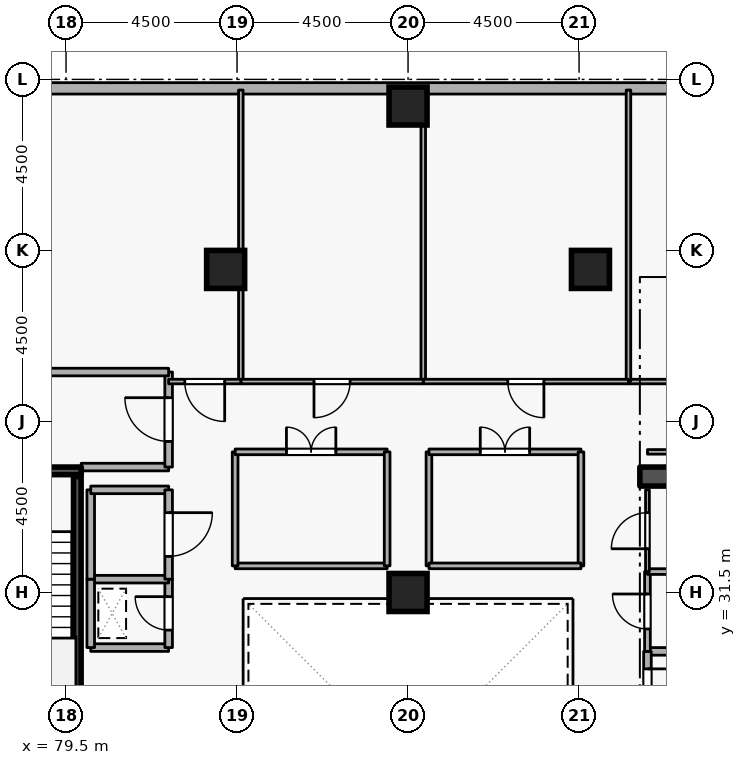
"""IFC4 building model, lengths in metres.
Left out: names, types, materials, properties, quantities, classifications, styles, units other than length and angle.
Written with IfcOpenShell. Run it as: python <this file> out.ifc"""

import sys

from ifc_helpers import new_model, si_unit, direction, frame, frame_2d, origin, origin_2d, place, context, subcontext, project, spatial, rectangle, extrude, element, fill, save


model = new_model("IFC4")
c1 = context("Model", 3, precision=1e-05, world=origin(), true_north=direction((0.0, 1.0)))
c2 = subcontext(c1, "Body", "Model", "MODEL_VIEW")
j1 = project(units=[si_unit("LENGTHUNIT", "METRE"), si_unit("PLANEANGLEUNIT", "RADIAN")], contexts=[c1])
p1 = place(None, origin())
s1 = spatial("IfcSite", under=j1, at=p1, CompositionType="ELEMENT")
p2 = place(p1, origin())
s2 = spatial("IfcBuilding", under=s1, at=p2, CompositionType="ELEMENT")
p3 = place(p2, frame((0.0, 0.0, 225.9)))
s3 = spatial("IfcBuildingStorey", under=s2, at=p3, CompositionType="ELEMENT", Elevation=225.9)
p4 = place(p3, frame((94.6, 34.55, 0.0), z_axis=(0.0, 0.0, 1.0), x_axis=(1.0, 0.0, 0.0)))
e1 = element("IfcWall", 1, at=p4, inside=s3, PredefinedType="SHEAR", context=c2, shape_type="SweptSolid", body=[
    extrude(rectangle(XDim=5.8, YDim=0.5, at=frame_2d((2.9, 0.0))), origin(), (0.0, 0.0, 1.0), 3.6),
])
for number, where, z_axis, x_axis in (
    (2, (88.5, 44.3, 0.0), (0.0, 0.0, 1.0), (1.0, 0.0, 0.0)),
    (3, (93.3, 40.0, 0.0), (0.0, 0.0, 1.0), (1.0, 0.0, 0.0)),
    (4, (83.7, 40.0, 0.0), (0.0, 0.0, 1.0), (1.0, 0.0, 0.0)),
    (5, (88.5, 31.5, 0.0), (0.0, 0.0, 1.0), (1.0, 0.0, 0.0)),
):
    element("IfcColumn", number, at=place(p3, frame(where, z_axis=z_axis, x_axis=x_axis)), inside=s3, PredefinedType="COLUMN", context=c2, shape_type="SweptSolid", body=[
        extrude(rectangle(XDim=1.0, YDim=1.0, at=origin_2d()), origin(), (0.0, 0.0, 1.0), 3.6),
    ])
p5 = place(p3, frame((103.681, 44.765, 0.0), z_axis=(0.0, 0.0, 1.0), x_axis=(-1.0, 0.0, 0.0)))
e6 = element("IfcWall", 6, at=p5, inside=s3, PredefinedType="STANDARD", context=c2, shape_type="SweptSolid", body=[
    extrude(rectangle(XDim=36.363, YDim=0.3, at=frame_2d((18.181, 0.0))), origin(), (0.0, 0.0, 1.0), 2.22),
])
p6 = place(p5, frame((30.6, 0.0, 0.72)))
e7 = element("IfcOpeningElement", 7, at=p6, cuts=e6, PredefinedType="OPENING", context=c2, shape_type="SweptSolid", body=[
    extrude(rectangle(XDim=1.35, YDim=1.05, at=frame_2d((0.675, 0.525))), frame((0.0, 0.16, 0.0), z_axis=(0.0, -1.0, 0.0), x_axis=(1.0, 0.0, 0.0)), (0.0, 0.0, 1.0), 0.32),
])
p7 = place(p3, frame((76.55, 34.7, 0.0), z_axis=(0.0, 0.0, 1.0), x_axis=(1.0, 0.0, 0.0)))
e8 = element("IfcWall", 8, at=p7, inside=s3, PredefinedType="SHEAR", context=c2, shape_type="SweptSolid", body=[
    extrude(rectangle(XDim=3.35, YDim=0.2, at=frame_2d((1.675, 0.0))), origin(), (0.0, 0.0, 1.0), 3.6),
])
p8 = place(p7, frame((1.125, 0.0, 0.0)))
e9 = element("IfcOpeningElement", 9, at=p8, cuts=e8, PredefinedType="OPENING", context=c2, shape_type="SweptSolid", body=[
    extrude(rectangle(XDim=1.1, YDim=2.1, at=frame_2d((0.55, 1.05))), frame((0.0, 0.11, 0.0), z_axis=(0.0, -1.0, 0.0), x_axis=(1.0, 0.0, 0.0)), (0.0, 0.0, 1.0), 0.22),
])
p9 = place(p3, frame((79.797, 27.45, 0.0), z_axis=(0.0, 0.0, 1.0), x_axis=(0.0, 1.0, 0.0)))
e10 = element("IfcWall", 10, at=p9, inside=s3, PredefinedType="SHEAR", context=c2, shape_type="SweptSolid", body=[
    extrude(rectangle(XDim=7.1, YDim=0.2, at=frame_2d((3.55, 0.0))), origin(), (0.0, 0.0, 1.0), 3.6),
])
p10 = place(p3, frame((79.9, 34.8, 0.0), z_axis=(0.0, 0.0, 1.0), x_axis=(1.0, 0.0, 0.0)))
e11 = element("IfcWall", 11, at=p10, inside=s3, PredefinedType="STANDARD", context=c2, shape_type="SweptSolid", body=[
    extrude(rectangle(XDim=2.3, YDim=0.2, at=frame_2d((1.15, 0.0))), origin(), (0.0, 0.0, 1.0), 2.505),
])
p11 = place(p3, frame((82.2, 34.8, 0.0), z_axis=(0.0, 0.0, 1.0), x_axis=(0.0, 1.0, 0.0)))
e12 = element("IfcWall", 12, at=p11, inside=s3, PredefinedType="STANDARD", context=c2, shape_type="SweptSolid", body=[
    extrude(rectangle(XDim=2.5, YDim=0.2, at=frame_2d((1.25, 0.0))), origin(), (0.0, 0.0, 1.0), 3.3),
])
p12 = place(p11, frame((0.675, 0.0, 0.0)))
e13 = element("IfcOpeningElement", 13, at=p12, cuts=e12, PredefinedType="OPENING", context=c2, shape_type="SweptSolid", body=[
    extrude(rectangle(XDim=1.15, YDim=2.1, at=frame_2d((0.575, 1.05))), frame((0.0, 0.11, 0.0), z_axis=(0.0, -1.0, 0.0), x_axis=(1.0, 0.0, 0.0)), (0.0, 0.0, 1.0), 0.22),
])
p13 = place(p3, frame((82.2, 37.3, 0.0), z_axis=(0.0, 0.0, 1.0), x_axis=(-1.0, 0.0, 0.0)))
e14 = element("IfcWall", 14, at=p13, inside=s3, PredefinedType="STANDARD", context=c2, shape_type="SweptSolid", body=[
    extrude(rectangle(XDim=5.7, YDim=0.2, at=frame_2d((2.85, 0.0))), origin(), (0.0, 0.0, 1.0), 3.3),
])
p14 = place(p3, frame((96.85, 29.95, 0.0), z_axis=(0.0, 0.0, 1.0), x_axis=(-1.0, 0.0, 0.0)))
e15 = element("IfcWall", 15, at=p14, inside=s3, PredefinedType="STANDARD", context=c2, shape_type="SweptSolid", body=[
    extrude(rectangle(XDim=2.05, YDim=0.2, at=frame_2d((1.025, 0.0))), origin(), (0.0, 0.0, 1.0), 3.3),
])
p15 = place(p3, frame((94.8, 29.95, 0.0), z_axis=(0.0, 0.0, 1.0), x_axis=(0.0, -1.0, 0.0)))
e16 = element("IfcWall", 16, at=p15, inside=s3, PredefinedType="STANDARD", context=c2, shape_type="SweptSolid", body=[
    extrude(rectangle(XDim=1.8, YDim=0.2, at=frame_2d((0.9, 0.0))), origin(), (0.0, 0.0, 1.0), 3.3),
])
p16 = place(p15, frame((0.46, 0.0, 0.0)))
e17 = element("IfcOpeningElement", 17, at=p16, cuts=e16, PredefinedType="OPENING", context=c2, shape_type="SweptSolid", body=[
    extrude(rectangle(XDim=0.88, YDim=2.04, at=frame_2d((0.44, 1.02))), frame((0.0, 0.11, 0.0), z_axis=(0.0, -1.0, 0.0), x_axis=(1.0, 0.0, 0.0)), (0.0, 0.0, 1.0), 0.22),
])
p17 = place(p3, frame((80.15, 30.05, 0.0), z_axis=(0.0, 0.0, 1.0), x_axis=(1.0, 0.0, 0.0)))
e18 = element("IfcWall", 18, at=p17, inside=s3, PredefinedType="STANDARD", context=c2, shape_type="SweptSolid", body=[
    extrude(rectangle(XDim=2.05, YDim=0.2, at=frame_2d((1.025, 0.0))), origin(), (0.0, 0.0, 1.0), 3.3),
])
p18 = place(p3, frame((82.2, 30.05, 0.0), z_axis=(0.0, 0.0, 1.0), x_axis=(0.0, 1.0, 0.0)))
e19 = element("IfcWall", 19, at=p18, inside=s3, PredefinedType="STANDARD", context=c2, shape_type="SweptSolid", body=[
    extrude(rectangle(XDim=1.8, YDim=0.2, at=frame_2d((0.9, 0.0))), origin(), (0.0, 0.0, 1.0), 3.3),
])
p19 = place(p18, frame((0.46, 0.0, 0.0)))
e20 = element("IfcOpeningElement", 20, at=p19, cuts=e19, PredefinedType="OPENING", context=c2, shape_type="SweptSolid", body=[
    extrude(rectangle(XDim=0.88, YDim=2.04, at=frame_2d((0.44, 1.02))), frame((0.0, 0.11, 0.0), z_axis=(0.0, -1.0, 0.0), x_axis=(1.0, 0.0, 0.0)), (0.0, 0.0, 1.0), 0.22),
])
p20 = place(p3, frame((82.2, 31.85, 0.0), z_axis=(0.0, 0.0, 1.0), x_axis=(-1.0, 0.0, 0.0)))
e21 = element("IfcWall", 21, at=p20, inside=s3, PredefinedType="STANDARD", context=c2, shape_type="SweptSolid", body=[
    extrude(rectangle(XDim=2.05, YDim=0.2, at=frame_2d((1.025, 0.0))), origin(), (0.0, 0.0, 1.0), 3.3),
])
p21 = place(p3, frame((80.15, 31.85, 0.0), z_axis=(0.0, 0.0, 1.0), x_axis=(0.0, -1.0, 0.0)))
e22 = element("IfcWall", 22, at=p21, inside=s3, PredefinedType="STANDARD", context=c2, shape_type="SweptSolid", body=[
    extrude(rectangle(XDim=1.8, YDim=0.2, at=frame_2d((0.9, 0.0))), origin(), (0.0, 0.0, 1.0), 3.3),
])
p22 = place(p3, frame((80.15, 31.85, 0.0), z_axis=(0.0, 0.0, 1.0), x_axis=(0.0, 1.0, 0.0)))
e23 = element("IfcWall", 23, at=p22, inside=s3, PredefinedType="STANDARD", context=c2, shape_type="SweptSolid", body=[
    extrude(rectangle(XDim=2.35, YDim=0.2, at=frame_2d((1.175, 0.0))), origin(), (0.0, 0.0, 1.0), 3.3),
])
p23 = place(p3, frame((80.15, 34.2, 0.0), z_axis=(0.0, 0.0, 1.0), x_axis=(1.0, 0.0, 0.0)))
e24 = element("IfcWall", 24, at=p23, inside=s3, PredefinedType="STANDARD", context=c2, shape_type="SweptSolid", body=[
    extrude(rectangle(XDim=2.05, YDim=0.2, at=frame_2d((1.025, 0.0))), origin(), (0.0, 0.0, 1.0), 2.505),
])
p24 = place(p3, frame((82.2, 34.2, 0.0), z_axis=(0.0, 0.0, 1.0), x_axis=(0.0, -1.0, 0.0)))
e25 = element("IfcWall", 25, at=p24, inside=s3, PredefinedType="STANDARD", context=c2, shape_type="SweptSolid", body=[
    extrude(rectangle(XDim=2.35, YDim=0.2, at=frame_2d((1.175, 0.0))), origin(), (0.0, 0.0, 1.0), 3.3),
])
p25 = place(p24, frame((0.6, 0.0, 0.0)))
e26 = element("IfcOpeningElement", 26, at=p25, cuts=e25, PredefinedType="OPENING", context=c2, shape_type="SweptSolid", body=[
    extrude(rectangle(XDim=1.15, YDim=2.1, at=frame_2d((0.575, 1.05))), frame((0.0, 0.11, 0.0), z_axis=(0.0, -1.0, 0.0), x_axis=(1.0, 0.0, 0.0)), (0.0, 0.0, 1.0), 0.22),
])
p26 = place(p3, frame((94.8, 29.95, 0.0), z_axis=(0.0, 0.0, 1.0), x_axis=(0.0, 1.0, 0.0)))
e27 = element("IfcWall", 27, at=p26, inside=s3, PredefinedType="PARTITIONING", context=c2, shape_type="SweptSolid", body=[
    extrude(rectangle(XDim=2.1, YDim=0.15, at=frame_2d((1.05, 0.0))), origin(), (0.0, 0.0, 1.0), 3.3),
])
p27 = place(p26, frame((0.59, 0.0, 0.0)))
e28 = element("IfcOpeningElement", 28, at=p27, cuts=e27, PredefinedType="OPENING", context=c2, shape_type="SweptSolid", body=[
    extrude(rectangle(XDim=0.92, YDim=2.08, at=frame_2d((0.46, 1.04))), frame((0.0, 0.085, 0.0), z_axis=(0.0, -1.0, 0.0), x_axis=(1.0, 0.0, 0.0)), (0.0, 0.0, 1.0), 0.17),
])
p28 = place(p3, frame((94.8, 32.05, 0.0), z_axis=(0.0, 0.0, 1.0), x_axis=(1.0, 0.0, 0.0)))
e29 = element("IfcWall", 29, at=p28, inside=s3, PredefinedType="PARTITIONING", context=c2, shape_type="SweptSolid", body=[
    extrude(rectangle(XDim=2.05, YDim=0.15, at=frame_2d((1.025, 0.0))), origin(), (0.0, 0.0, 1.0), 3.3),
])
p29 = place(p3, frame((94.8, 32.05, 0.0), z_axis=(0.0, 0.0, 1.0), x_axis=(0.0, 1.0, 0.0)))
e30 = element("IfcWall", 30, at=p29, inside=s3, PredefinedType="PARTITIONING", context=c2, shape_type="SweptSolid", body=[
    extrude(rectangle(XDim=2.15, YDim=0.1, at=frame_2d((1.075, 0.0))), origin(), (0.0, 0.0, 1.0), 3.3),
])
p30 = place(p29, frame((0.6, 0.0, 0.0)))
e31 = element("IfcOpeningElement", 31, at=p30, cuts=e30, PredefinedType="OPENING", context=c2, shape_type="SweptSolid", body=[
    extrude(rectangle(XDim=0.95, YDim=2.1, at=frame_2d((0.475, 1.05))), frame((0.0, 0.06, 0.0), z_axis=(0.0, -1.0, 0.0), x_axis=(1.0, 0.0, 0.0)), (0.0, 0.0, 1.0), 0.12),
])
p31 = place(p3, frame((94.8, 35.2, 0.0), z_axis=(0.0, 0.0, 1.0), x_axis=(1.0, 0.0, 0.0)))
e32 = element("IfcWall", 32, at=p31, inside=s3, PredefinedType="PARTITIONING", context=c2, shape_type="SweptSolid", body=[
    extrude(rectangle(XDim=5.9, YDim=0.12, at=frame_2d((2.95, 0.0))), origin(), (0.0, 0.0, 1.0), 3.3),
])
p32 = place(p3, frame((100.7, 37.05, 0.0), z_axis=(0.0, 0.0, 1.0), x_axis=(-1.0, 0.0, 0.0)))
e33 = element("IfcWall", 33, at=p32, inside=s3, PredefinedType="PARTITIONING", context=c2, shape_type="SweptSolid", body=[
    extrude(rectangle(XDim=6.4, YDim=0.12, at=frame_2d((3.2, 0.0))), origin(), (0.0, 0.0, 1.0), 3.3),
])
p33 = place(p32, frame((2.675, 0.0, 0.0)))
e34 = element("IfcOpeningElement", 34, at=p33, cuts=e33, PredefinedType="OPENING", context=c2, shape_type="SweptSolid", body=[
    extrude(rectangle(XDim=1.05, YDim=2.1, at=frame_2d((0.525, 1.05))), frame((0.0, 0.07, 0.0), z_axis=(0.0, -1.0, 0.0), x_axis=(1.0, 0.0, 0.0)), (0.0, 0.0, 1.0), 0.14),
])
for number, where, z_axis, x_axis in (
    (35, (94.3, 37.05, 0.0), (0.0, 0.0, 1.0), (0.0, 1.0, 0.0)),
    (36, (88.9, 37.05, 0.0), (0.0, 0.0, 1.0), (0.0, 1.0, 0.0)),
):
    element("IfcWall", number, at=place(p3, frame(where, z_axis=z_axis, x_axis=x_axis)), inside=s3, PredefinedType="PARTITIONING", context=c2, shape_type="SweptSolid", body=[
        extrude(rectangle(XDim=7.67, YDim=0.12, at=frame_2d((3.835, 0.0))), origin(), (0.0, 0.0, 1.0), 3.3),
    ])
p34 = place(p3, frame((94.3, 37.05, 0.0), z_axis=(0.0, 0.0, 1.0), x_axis=(-1.0, 0.0, 0.0)))
e37 = element("IfcWall", 37, at=p34, inside=s3, PredefinedType="PARTITIONING", context=c2, shape_type="SweptSolid", body=[
    extrude(rectangle(XDim=5.4, YDim=0.12, at=frame_2d((2.7, 0.0))), origin(), (0.0, 0.0, 1.0), 3.3),
])
p35 = place(p34, frame((2.225, 0.0, 0.0)))
e38 = element("IfcOpeningElement", 38, at=p35, cuts=e37, PredefinedType="OPENING", context=c2, shape_type="SweptSolid", body=[
    extrude(rectangle(XDim=0.95, YDim=2.1, at=frame_2d((0.475, 1.05))), frame((0.0, 0.07, 0.0), z_axis=(0.0, -1.0, 0.0), x_axis=(1.0, 0.0, 0.0)), (0.0, 0.0, 1.0), 0.14),
])
p36 = place(p3, frame((84.1, 37.05, 0.0), z_axis=(0.0, 0.0, 1.0), x_axis=(0.0, 1.0, 0.0)))
e39 = element("IfcWall", 39, at=p36, inside=s3, PredefinedType="PARTITIONING", context=c2, shape_type="SweptSolid", body=[
    extrude(rectangle(XDim=7.67, YDim=0.12, at=frame_2d((3.835, 0.0))), origin(), (0.0, 0.0, 1.0), 3.3),
])
p37 = place(p3, frame((88.9, 37.05, 0.0), z_axis=(0.0, 0.0, 1.0), x_axis=(-1.0, 0.0, 0.0)))
e40 = element("IfcWall", 40, at=p37, inside=s3, PredefinedType="PARTITIONING", context=c2, shape_type="SweptSolid", body=[
    extrude(rectangle(XDim=4.8, YDim=0.12, at=frame_2d((2.4, 0.0))), origin(), (0.0, 0.0, 1.0), 3.3),
])
p38 = place(p37, frame((1.925, 0.0, 0.0)))
e41 = element("IfcOpeningElement", 41, at=p38, cuts=e40, PredefinedType="OPENING", context=c2, shape_type="SweptSolid", body=[
    extrude(rectangle(XDim=0.95, YDim=2.1, at=frame_2d((0.475, 1.05))), frame((0.0, 0.07, 0.0), z_axis=(0.0, -1.0, 0.0), x_axis=(1.0, 0.0, 0.0)), (0.0, 0.0, 1.0), 0.14),
])
p39 = place(p3, frame((84.1, 37.05, 0.0), z_axis=(0.0, 0.0, 1.0), x_axis=(-1.0, 0.0, 0.0)))
e42 = element("IfcWall", 42, at=p39, inside=s3, PredefinedType="PARTITIONING", context=c2, shape_type="SweptSolid", body=[
    extrude(rectangle(XDim=1.9, YDim=0.12, at=frame_2d((0.95, 0.0))), origin(), (0.0, 0.0, 1.0), 3.3),
])
p40 = place(p39, frame((0.425, 0.0, 0.0)))
e43 = element("IfcOpeningElement", 43, at=p40, cuts=e42, PredefinedType="OPENING", context=c2, shape_type="SweptSolid", body=[
    extrude(rectangle(XDim=1.05, YDim=2.1, at=frame_2d((0.525, 1.05))), frame((0.0, 0.07, 0.0), z_axis=(0.0, -1.0, 0.0), x_axis=(1.0, 0.0, 0.0)), (0.0, 0.0, 1.0), 0.14),
])
p41 = place(p3, frame((89.05, 32.2, 0.0), z_axis=(0.0, 0.0, 1.0), x_axis=(0.0, 1.0, 0.0)))
e44 = element("IfcWall", 44, at=p41, inside=s3, PredefinedType="PARTITIONING", context=c2, shape_type="SweptSolid", body=[
    extrude(rectangle(XDim=3.0, YDim=0.15, at=frame_2d((1.5, 0.0))), origin(), (0.0, 0.0, 1.0), 3.3),
])
p42 = place(p3, frame((89.05, 35.2, 0.0), z_axis=(0.0, 0.0, 1.0), x_axis=(1.0, 0.0, 0.0)))
e45 = element("IfcWall", 45, at=p42, inside=s3, PredefinedType="PARTITIONING", context=c2, shape_type="SweptSolid", body=[
    extrude(rectangle(XDim=4.0, YDim=0.15, at=frame_2d((2.0, 0.0))), origin(), (0.0, 0.0, 1.0), 3.3),
])
p43 = place(p42, frame((1.35, 0.0, 0.0)))
e46 = element("IfcOpeningElement", 46, at=p43, cuts=e45, PredefinedType="OPENING", context=c2, shape_type="SweptSolid", body=[
    extrude(rectangle(XDim=1.3, YDim=2.12, at=frame_2d((0.65, 1.06))), frame((0.0, 0.085, 0.0), z_axis=(0.0, -1.0, 0.0), x_axis=(1.0, 0.0, 0.0)), (0.0, 0.0, 1.0), 0.17),
])
p44 = place(p3, frame((93.05, 35.2, 0.0), z_axis=(0.0, 0.0, 1.0), x_axis=(0.0, -1.0, 0.0)))
e47 = element("IfcWall", 47, at=p44, inside=s3, PredefinedType="PARTITIONING", context=c2, shape_type="SweptSolid", body=[
    extrude(rectangle(XDim=3.0, YDim=0.15, at=frame_2d((1.5, 0.0))), origin(), (0.0, 0.0, 1.0), 3.3),
])
for number, where, z_axis, x_axis in (
    (48, (93.05, 32.2, 0.0), (0.0, 0.0, 1.0), (-1.0, 0.0, 0.0)),
    (49, (87.95, 32.2, 0.0), (0.0, 0.0, 1.0), (-1.0, 0.0, 0.0)),
):
    element("IfcWall", number, at=place(p3, frame(where, z_axis=z_axis, x_axis=x_axis)), inside=s3, PredefinedType="PARTITIONING", context=c2, shape_type="SweptSolid", body=[
        extrude(rectangle(XDim=4.0, YDim=0.15, at=frame_2d((2.0, 0.0))), origin(), (0.0, 0.0, 1.0), 3.3),
    ])
p45 = place(p3, frame((83.95, 32.2, 0.0), z_axis=(0.0, 0.0, 1.0), x_axis=(0.0, 1.0, 0.0)))
e50 = element("IfcWall", 50, at=p45, inside=s3, PredefinedType="PARTITIONING", context=c2, shape_type="SweptSolid", body=[
    extrude(rectangle(XDim=3.0, YDim=0.15, at=frame_2d((1.5, 0.0))), origin(), (0.0, 0.0, 1.0), 3.3),
])
p46 = place(p3, frame((83.95, 35.2, 0.0), z_axis=(0.0, 0.0, 1.0), x_axis=(1.0, 0.0, 0.0)))
e51 = element("IfcWall", 51, at=p46, inside=s3, PredefinedType="PARTITIONING", context=c2, shape_type="SweptSolid", body=[
    extrude(rectangle(XDim=4.0, YDim=0.15, at=frame_2d((2.0, 0.0))), origin(), (0.0, 0.0, 1.0), 3.3),
])
p47 = place(p46, frame((1.35, 0.0, 0.0)))
e52 = element("IfcOpeningElement", 52, at=p47, cuts=e51, PredefinedType="OPENING", context=c2, shape_type="SweptSolid", body=[
    extrude(rectangle(XDim=1.3, YDim=2.12, at=frame_2d((0.65, 1.06))), frame((0.0, 0.085, 0.0), z_axis=(0.0, -1.0, 0.0), x_axis=(1.0, 0.0, 0.0)), (0.0, 0.0, 1.0), 0.17),
])
p48 = place(p3, frame((87.95, 35.2, 0.0), z_axis=(0.0, 0.0, 1.0), x_axis=(0.0, -1.0, 0.0)))
e53 = element("IfcWall", 53, at=p48, inside=s3, PredefinedType="PARTITIONING", context=c2, shape_type="SweptSolid", body=[
    extrude(rectangle(XDim=3.0, YDim=0.15, at=frame_2d((1.5, 0.0))), origin(), (0.0, 0.0, 1.0), 3.3),
])
p49 = place(p12, origin())
e54 = element("IfcDoor", 54, at=p49, inside=s3, OperationType="SINGLE_SWING_RIGHT", PredefinedType="DOOR", context=c2, shape_type="SweptSolid", body=[
    extrude(rectangle(XDim=1.15, YDim=2.1, at=frame_2d((0.575, 1.05))), frame((0.0, 0.025, 0.0), z_axis=(0.0, -1.0, 0.0), x_axis=(1.0, 0.0, 0.0)), (0.0, 0.0, 1.0), 0.05),
])
fill(e13, e54)
p50 = place(p16, origin())
e55 = element("IfcDoor", 55, at=p50, inside=s3, OperationType="SINGLE_SWING_LEFT", PredefinedType="DOOR", context=c2, shape_type="SweptSolid", body=[
    extrude(rectangle(XDim=0.88, YDim=2.04, at=frame_2d((0.44, 1.02))), frame((0.0, 0.025, 0.0), z_axis=(0.0, -1.0, 0.0), x_axis=(1.0, 0.0, 0.0)), (0.0, 0.0, 1.0), 0.05),
])
fill(e17, e55)
p51 = place(p19, origin())
e56 = element("IfcDoor", 56, at=p51, inside=s3, OperationType="SINGLE_SWING_RIGHT", PredefinedType="DOOR", context=c2, shape_type="SweptSolid", body=[
    extrude(rectangle(XDim=0.88, YDim=2.04, at=frame_2d((0.44, 1.02))), frame((0.0, 0.025, 0.0), z_axis=(0.0, -1.0, 0.0), x_axis=(1.0, 0.0, 0.0)), (0.0, 0.0, 1.0), 0.05),
])
fill(e20, e56)
p52 = place(p27, origin())
e57 = element("IfcDoor", 57, at=p52, inside=s3, OperationType="SINGLE_SWING_RIGHT", PredefinedType="DOOR", context=c2, shape_type="SweptSolid", body=[
    extrude(rectangle(XDim=0.92, YDim=2.08, at=frame_2d((0.46, 1.04))), frame((0.0, 0.025, 0.0), z_axis=(0.0, -1.0, 0.0), x_axis=(1.0, 0.0, 0.0)), (0.0, 0.0, 1.0), 0.05),
])
fill(e28, e57)
p53 = place(p30, origin())
e58 = element("IfcDoor", 58, at=p53, inside=s3, OperationType="SINGLE_SWING_LEFT", PredefinedType="DOOR", context=c2, shape_type="SweptSolid", body=[
    extrude(rectangle(XDim=0.95, YDim=2.1, at=frame_2d((0.475, 1.05))), frame((0.0, 0.025, 0.0), z_axis=(0.0, -1.0, 0.0), x_axis=(1.0, 0.0, 0.0)), (0.0, 0.0, 1.0), 0.05),
])
fill(e31, e58)
p54 = place(p25, origin())
e59 = element("IfcDoor", 59, at=p54, inside=s3, OperationType="SINGLE_SWING_LEFT", PredefinedType="DOOR", context=c2, shape_type="SweptSolid", body=[
    extrude(rectangle(XDim=1.15, YDim=2.1, at=frame_2d((0.575, 1.05))), frame((0.0, 0.025, 0.0), z_axis=(0.0, -1.0, 0.0), x_axis=(1.0, 0.0, 0.0)), (0.0, 0.0, 1.0), 0.05),
])
fill(e26, e59)
p55 = place(p35, origin())
e60 = element("IfcDoor", 60, at=p55, inside=s3, OperationType="SINGLE_SWING_LEFT", PredefinedType="DOOR", context=c2, shape_type="SweptSolid", body=[
    extrude(rectangle(XDim=0.95, YDim=2.1, at=frame_2d((0.475, 1.05))), frame((0.0, 0.025, 0.0), z_axis=(0.0, -1.0, 0.0), x_axis=(1.0, 0.0, 0.0)), (0.0, 0.0, 1.0), 0.05),
])
fill(e38, e60)
p56 = place(p38, origin())
e61 = element("IfcDoor", 61, at=p56, inside=s3, OperationType="SINGLE_SWING_RIGHT", PredefinedType="DOOR", context=c2, shape_type="SweptSolid", body=[
    extrude(rectangle(XDim=0.95, YDim=2.1, at=frame_2d((0.475, 1.05))), frame((0.0, 0.025, 0.0), z_axis=(0.0, -1.0, 0.0), x_axis=(1.0, 0.0, 0.0)), (0.0, 0.0, 1.0), 0.05),
])
fill(e41, e61)
p57 = place(p40, origin())
e62 = element("IfcDoor", 62, at=p57, inside=s3, OperationType="SINGLE_SWING_LEFT", PredefinedType="DOOR", context=c2, shape_type="SweptSolid", body=[
    extrude(rectangle(XDim=1.05, YDim=2.1, at=frame_2d((0.525, 1.05))), frame((0.0, 0.025, 0.0), z_axis=(0.0, -1.0, 0.0), x_axis=(1.0, 0.0, 0.0)), (0.0, 0.0, 1.0), 0.05),
])
fill(e43, e62)
p58 = place(p43, origin())
e63 = element("IfcDoor", 63, at=p58, inside=s3, OperationType="DOUBLE_DOOR_SINGLE_SWING", PredefinedType="DOOR", context=c2, shape_type="SweptSolid", body=[
    extrude(rectangle(XDim=1.3, YDim=2.12, at=frame_2d((0.65, 1.06))), frame((0.0, 0.025, 0.0), z_axis=(0.0, -1.0, 0.0), x_axis=(1.0, 0.0, 0.0)), (0.0, 0.0, 1.0), 0.05),
])
fill(e46, e63)
p59 = place(p47, origin())
e64 = element("IfcDoor", 64, at=p59, inside=s3, OperationType="DOUBLE_DOOR_SINGLE_SWING", PredefinedType="DOOR", context=c2, shape_type="SweptSolid", body=[
    extrude(rectangle(XDim=1.3, YDim=2.12, at=frame_2d((0.65, 1.06))), frame((0.0, 0.025, 0.0), z_axis=(0.0, -1.0, 0.0), x_axis=(1.0, 0.0, 0.0)), (0.0, 0.0, 1.0), 0.05),
])
fill(e52, e64)
save(model, sys.argv[1])
